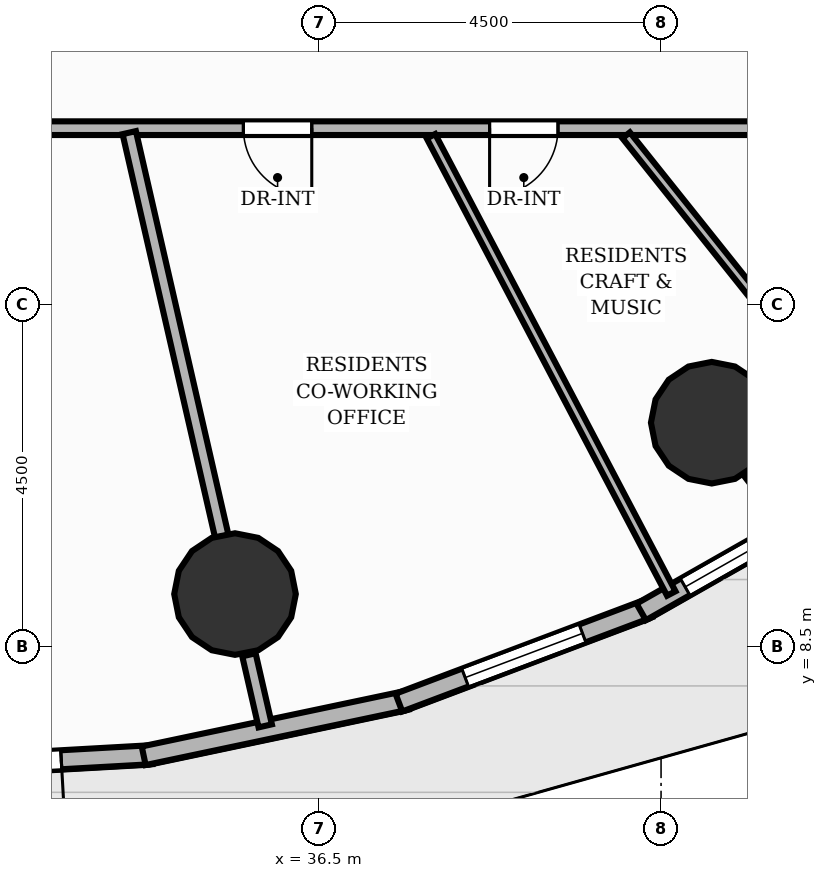
"""IFC4 building model, lengths in metres.
Left out: names, types, materials, properties, quantities, classifications, styles, units other than length and angle.
Written with IfcOpenShell. Run it as: python <this file> out.ifc"""

import sys

from ifc_helpers import new_model, si_unit, direction, frame, frame_2d, origin, origin_2d, place, context, subcontext, project, spatial, rectangle, circle, extrude, element, fill, save


model = new_model("IFC4")
c1 = context("Model", 3, precision=1e-05, world=origin(), true_north=direction((0.0, 1.0)))
c2 = subcontext(c1, "Body", "Model", "MODEL_VIEW")
j1 = project(units=[si_unit("LENGTHUNIT", "METRE"), si_unit("PLANEANGLEUNIT", "RADIAN")], contexts=[c1])
p1 = place(None, origin())
s1 = spatial("IfcSite", under=j1, at=p1, CompositionType="ELEMENT")
p2 = place(p1, origin())
s2 = spatial("IfcBuilding", under=s1, at=p2, CompositionType="ELEMENT")
p3 = place(p2, frame((0.0, 0.0, 37.6)))
s3 = spatial("IfcBuildingStorey", under=s2, at=p3, CompositionType="ELEMENT", Elevation=37.6)
for number, where, z_axis, x_axis in (
    (1, (35.395, 9.19, 0.0), (0.0, 0.0, 1.0), (1.0, 0.0, 0.0)),
    (2, (41.667, 11.445, 0.0), (0.0, 0.0, 1.0), (1.0, 0.0, 0.0)),
):
    element("IfcColumn", number, at=place(p3, frame(where, z_axis=z_axis, x_axis=x_axis)), inside=s3, PredefinedType="COLUMN", context=c2, shape_type="SweptSolid", body=[
        extrude(circle(Radius=0.8, at=origin_2d()), origin(), (0.0, 0.0, 1.0), 3.2),
    ])
p4 = place(p3, frame((34.301, 7.077, 0.0), z_axis=(0.0, 0.0, 1.0), x_axis=(-0.998425121055, -0.056100602904, 0.0)))
e3 = element("IfcWall", 3, at=p4, inside=s3, PredefinedType="SOLIDWALL", context=c2, shape_type="SweptSolid", body=[
    extrude(rectangle(XDim=3.538, YDim=0.25, at=frame_2d((1.769, 0.0))), origin(), (0.0, 0.0, 1.0), 2.96),
])
p5 = place(p4, frame((1.194, 0.0, 0.0)))
e4 = element("IfcOpeningElement", 4, at=p5, cuts=e3, PredefinedType="OPENING", context=c2, shape_type="SweptSolid", body=[
    extrude(rectangle(XDim=1.15, YDim=2.2, at=frame_2d((0.575, 1.1))), frame((0.0, 0.135, 0.0), z_axis=(0.0, -1.0, 0.0), x_axis=(1.0, 0.0, 0.0)), (0.0, 0.0, 1.0), 0.27),
])
p6 = place(p3, frame((37.655, 7.792, 0.0), z_axis=(0.0, 0.0, 1.0), x_axis=(-0.978483842038, -0.206323461756, 0.0)))
e5 = element("IfcWall", 5, at=p6, inside=s3, PredefinedType="SOLIDWALL", context=c2, shape_type="SweptSolid", body=[
    extrude(rectangle(XDim=3.538, YDim=0.25, at=frame_2d((1.769, 0.0))), origin(), (0.0, 0.0, 1.0), 2.96),
])
p7 = place(p3, frame((40.838, 9.001, 0.0), z_axis=(0.0, 0.0, 1.0), x_axis=(-0.935679231508, -0.352851775857, 0.0)))
e6 = element("IfcWall", 6, at=p7, inside=s3, PredefinedType="SOLIDWALL", context=c2, shape_type="SweptSolid", body=[
    extrude(rectangle(XDim=3.513, YDim=0.25, at=frame_2d((1.756, 0.0))), origin(), (0.0, 0.0, 1.0), 2.96),
])
p8 = place(p7, frame((0.931, 0.0, 0.85)))
e7 = element("IfcOpeningElement", 7, at=p8, cuts=e6, PredefinedType="OPENING", context=c2, shape_type="SweptSolid", body=[
    extrude(rectangle(XDim=1.65, YDim=1.55, at=frame_2d((0.825, 0.775))), frame((0.0, 0.135, 0.0), z_axis=(0.0, -1.0, 0.0), x_axis=(1.0, 0.0, 0.0)), (0.0, 0.0, 1.0), 0.27),
])
p9 = place(p3, frame((43.751, 10.667, 0.0), z_axis=(0.0, 0.0, 1.0), x_axis=(-0.869389832426, -0.494126825091, 0.0)))
e8 = element("IfcWall", 8, at=p9, inside=s3, PredefinedType="SOLIDWALL", context=c2, shape_type="SweptSolid", body=[
    extrude(rectangle(XDim=3.465, YDim=0.25, at=frame_2d((1.732, 0.0))), origin(), (0.0, 0.0, 1.0), 2.96),
])
p10 = place(p9, frame((1.4, 0.0, 0.85)))
e9 = element("IfcOpeningElement", 9, at=p10, cuts=e8, PredefinedType="OPENING", context=c2, shape_type="SweptSolid", body=[
    extrude(rectangle(XDim=1.4, YDim=1.29, at=frame_2d((0.7, 0.645))), frame((0.0, 0.135, 0.0), z_axis=(0.0, -1.0, 0.0), x_axis=(1.0, 0.0, 0.0)), (0.0, 0.0, 1.0), 0.27),
])
p11 = place(p3, frame((35.578, 8.391, 0.0), z_axis=(0.0, 0.0, 1.0), x_axis=(0.223204870581, -0.974771555673, 0.0)))
e10 = element("IfcWall", 10, at=p11, inside=s3, PredefinedType="PARTITIONING", context=c2, shape_type="SweptSolid", body=[
    extrude(rectangle(XDim=0.959, YDim=0.18, at=frame_2d((0.479, 0.0))), origin(), (0.0, 0.0, 1.0), 2.178),
])
p12 = place(p3, frame((42.167, 10.795, 0.0), z_axis=(0.0, 0.0, 1.0), x_axis=(0.609822176225, -0.792538272504, 0.0)))
e11 = element("IfcWall", 11, at=p12, inside=s3, PredefinedType="PARTITIONING", context=c2, shape_type="SweptSolid", body=[
    extrude(rectangle(XDim=0.847, YDim=0.18, at=frame_2d((0.424, 0.0))), origin(), (0.0, 0.0, 1.0), 2.178),
])
p13 = place(p3, frame((42.68, 15.32, 0.0), z_axis=(0.0, 0.0, 1.0), x_axis=(-1.0, 0.0, 0.0)))
e12 = element("IfcWall", 12, at=p13, inside=s3, PredefinedType="PARTITIONING", context=c2, shape_type="SweptSolid", body=[
    extrude(rectangle(XDim=21.36, YDim=0.18, at=frame_2d((10.68, 0.0))), origin(), (0.0, 0.0, 1.0), 2.955),
])
p14 = place(p13, frame((3.036, 0.0, 0.0)))
e13 = element("IfcOpeningElement", 13, at=p14, cuts=e12, PredefinedType="OPENING", context=c2, shape_type="SweptSolid", body=[
    extrude(rectangle(XDim=0.9, YDim=2.1, at=frame_2d((0.45, 1.05))), frame((0.0, 0.1, 0.0), z_axis=(0.0, -1.0, 0.0), x_axis=(1.0, 0.0, 0.0)), (0.0, 0.0, 1.0), 0.2),
])
p15 = place(p13, frame((6.275, 0.0, 0.0)))
e14 = element("IfcOpeningElement", 14, at=p15, cuts=e12, PredefinedType="OPENING", context=c2, shape_type="SweptSolid", body=[
    extrude(rectangle(XDim=0.9, YDim=2.1, at=frame_2d((0.45, 1.05))), frame((0.0, 0.1, 0.0), z_axis=(0.0, -1.0, 0.0), x_axis=(1.0, 0.0, 0.0)), (0.0, 0.0, 1.0), 0.2),
])
p16 = place(p13, frame((14.49, 0.0, 0.0)))
e15 = element("IfcOpeningElement", 15, at=p16, cuts=e12, PredefinedType="OPENING", context=c2, shape_type="SweptSolid", body=[
    extrude(rectangle(XDim=1.05, YDim=2.15, at=frame_2d((0.525, 1.075))), frame((0.0, 0.1, 0.0), z_axis=(0.0, -1.0, 0.0), x_axis=(1.0, 0.0, 0.0)), (0.0, 0.0, 1.0), 0.2),
])
p17 = place(p3, frame((43.998, 10.897, 0.0), z_axis=(0.0, 0.0, 1.0), x_axis=(-0.623937025269, 0.781474624347, 0.0)))
e16 = element("IfcWall", 16, at=p17, inside=s3, PredefinedType="PARTITIONING", context=c2, shape_type="SweptSolid", body=[
    extrude(rectangle(XDim=5.54, YDim=0.125, at=frame_2d((2.77, 0.0))), origin(), (0.0, 0.0, 1.0), 2.955),
])
p18 = place(p3, frame((41.135, 9.197, 0.0), z_axis=(0.0, 0.0, 1.0), x_axis=(-0.465197105493, 0.885207124373, 0.0)))
e17 = element("IfcWall", 17, at=p18, inside=s3, PredefinedType="PARTITIONING", context=c2, shape_type="SweptSolid", body=[
    extrude(rectangle(XDim=6.797, YDim=0.125, at=frame_2d((3.398, 0.0))), origin(), (0.0, 0.0, 1.0), 2.955),
])
p19 = place(p3, frame((35.221, 9.948, 0.0), z_axis=(0.0, 0.0, 1.0), x_axis=(-0.223436436687, 0.974718502318, 0.0)))
e18 = element("IfcWall", 18, at=p19, inside=s3, PredefinedType="PARTITIONING", context=c2, shape_type="SweptSolid", body=[
    extrude(rectangle(XDim=5.451, YDim=0.18, at=frame_2d((2.726, 0.0))), origin(), (0.0, 0.0, 1.0), 2.178),
])
p20 = place(p5, origin())
e19 = element("IfcDoor", 19, at=p20, inside=s3, OperationType="SINGLE_SWING_LEFT", PredefinedType="DOOR", context=c2, shape_type="SweptSolid", body=[
    extrude(rectangle(XDim=1.15, YDim=2.2, at=frame_2d((0.575, 1.1))), frame((0.0, 0.025, 0.0), z_axis=(0.0, -1.0, 0.0), x_axis=(1.0, 0.0, 0.0)), (0.0, 0.0, 1.0), 0.05),
])
fill(e4, e19)
p21 = place(p8, origin())
e20 = element("IfcWindow", 20, at=p21, inside=s3, PartitioningType="SINGLE_PANEL", PredefinedType="WINDOW", context=c2, shape_type="SweptSolid", body=[
    extrude(rectangle(XDim=1.65, YDim=1.55, at=frame_2d((0.825, 0.775))), frame((0.0, 0.03, 0.0), z_axis=(0.0, -1.0, 0.0), x_axis=(1.0, 0.0, 0.0)), (0.0, 0.0, 1.0), 0.06),
])
fill(e7, e20)
p22 = place(p10, origin())
e21 = element("IfcWindow", 21, at=p22, inside=s3, PartitioningType="SINGLE_PANEL", PredefinedType="WINDOW", context=c2, shape_type="SweptSolid", body=[
    extrude(rectangle(XDim=1.4, YDim=1.29, at=frame_2d((0.7, 0.645))), frame((0.0, 0.03, 0.0), z_axis=(0.0, -1.0, 0.0), x_axis=(1.0, 0.0, 0.0)), (0.0, 0.0, 1.0), 0.06),
])
fill(e9, e21)
p23 = place(p14, origin())
e22 = element("IfcDoor", 22, at=p23, inside=s3, OperationType="SINGLE_SWING_RIGHT", PredefinedType="DOOR", context=c2, shape_type="SweptSolid", body=[
    extrude(rectangle(XDim=0.9, YDim=2.1, at=frame_2d((0.45, 1.05))), frame((0.0, 0.025, 0.0), z_axis=(0.0, -1.0, 0.0), x_axis=(1.0, 0.0, 0.0)), (0.0, 0.0, 1.0), 0.05),
])
fill(e13, e22)
p24 = place(p15, origin())
e23 = element("IfcDoor", 23, at=p24, inside=s3, OperationType="SINGLE_SWING_LEFT", PredefinedType="DOOR", context=c2, shape_type="SweptSolid", body=[
    extrude(rectangle(XDim=0.9, YDim=2.1, at=frame_2d((0.45, 1.05))), frame((0.0, 0.025, 0.0), z_axis=(0.0, -1.0, 0.0), x_axis=(1.0, 0.0, 0.0)), (0.0, 0.0, 1.0), 0.05),
])
fill(e14, e23)
save(model, sys.argv[1])
